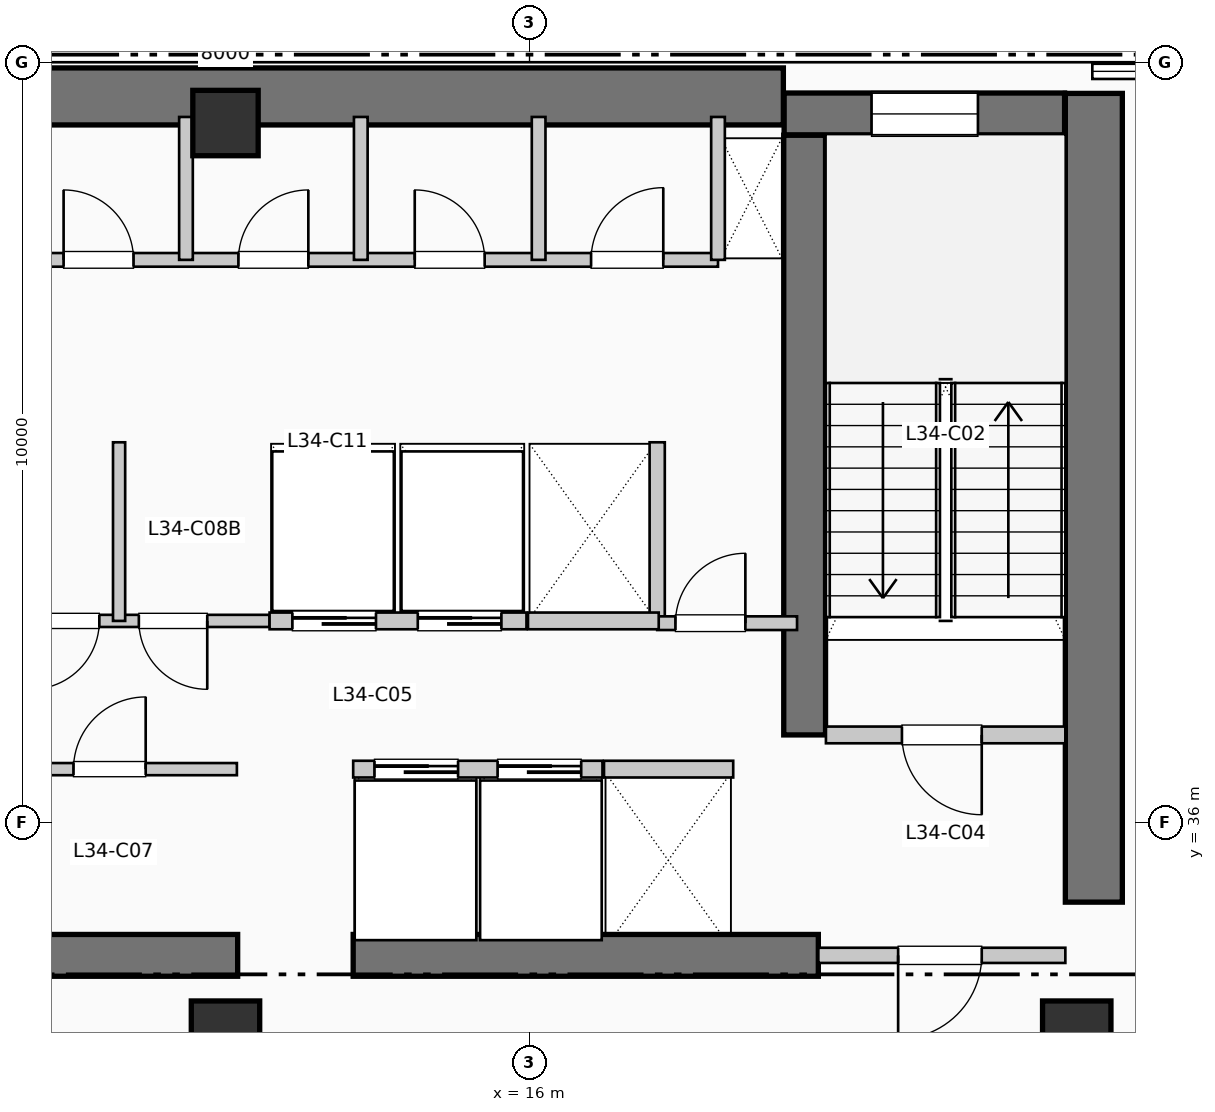
"""IFC4 building model, lengths in metres.
Left out: names, types, materials, properties, quantities, classifications, styles, units other than length and angle.
Written with IfcOpenShell. Run it as: python <this file> out.ifc"""

import sys

from ifc_helpers import new_model, si_unit, direction, frame, frame_2d, origin, origin_2d, place, context, subcontext, project, spatial, rectangle, extrude, element, fill, save


model = new_model("IFC4")
c1 = context("Model", 3, precision=1e-05, world=origin(), true_north=direction((0.0, 1.0)))
c2 = subcontext(c1, "Body", "Model", "MODEL_VIEW")
j1 = project(units=[si_unit("LENGTHUNIT", "METRE"), si_unit("PLANEANGLEUNIT", "RADIAN")], contexts=[c1])
p1 = place(None, origin())
s1 = spatial("IfcSite", under=j1, at=p1, CompositionType="ELEMENT")
p2 = place(p1, origin())
s2 = spatial("IfcBuilding", under=s1, at=p2, CompositionType="ELEMENT")
p3 = place(p2, frame((0.0, 0.0, 142.89)))
s3 = spatial("IfcBuildingStorey", under=s2, at=p3, CompositionType="ELEMENT", Elevation=142.89)
p4 = place(p3, frame((5.36, 45.55, 0.0), z_axis=(0.0, 0.0, 1.0), x_axis=(1.0, 0.0, 0.0)))
e1 = element("IfcWall", 1, at=p4, inside=s3, PredefinedType="SHEAR", context=c2, shape_type="SweptSolid", body=[
    extrude(rectangle(XDim=13.98, YDim=0.75, at=frame_2d((6.99, 0.0))), origin(), (0.0, 0.0, 1.0), 3.96),
])
p5 = place(p3, frame((23.425, 34.95, 0.0), z_axis=(0.0, 0.0, 1.0), x_axis=(0.0, 1.0, 0.0)))
e2 = element("IfcWall", 2, at=p5, inside=s3, PredefinedType="SHEAR", context=c2, shape_type="SweptSolid", body=[
    extrude(rectangle(XDim=10.64, YDim=0.75, at=frame_2d((5.32, 0.0))), origin(), (0.0, 0.0, 1.0), 3.96),
])
p6 = place(p3, frame((1.45, 34.25, 0.0), z_axis=(0.0, 0.0, 1.0), x_axis=(1.0, 0.0, 0.0)))
e3 = element("IfcWall", 3, at=p6, inside=s3, PredefinedType="SHEAR", context=c2, shape_type="SweptSolid", body=[
    extrude(rectangle(XDim=10.71, YDim=0.55, at=frame_2d((5.355, 0.0))), origin(), (0.0, 0.0, 1.0), 3.96),
])
p7 = place(p6, frame((7.25, 0.0, 0.0), z_axis=(0.0, 0.0, 1.0), x_axis=(-1.0, 0.0, 0.0)))
e4 = element("IfcOpeningElement", 4, at=p7, cuts=e3, PredefinedType="OPENING", context=c2, shape_type="SweptSolid", body=[
    extrude(rectangle(XDim=1.1, YDim=2.15, at=frame_2d((0.55, 1.075))), frame((0.0, 0.285, 0.0), z_axis=(0.0, -1.0, 0.0), x_axis=(1.0, 0.0, 0.0)), (0.0, 0.0, 1.0), 0.57),
])
p8 = place(p3, frame((13.68, 34.25, 0.0), z_axis=(0.0, 0.0, 1.0), x_axis=(1.0, 0.0, 0.0)))
e5 = element("IfcWall", 5, at=p8, inside=s3, PredefinedType="SHEAR", context=c2, shape_type="SweptSolid", body=[
    extrude(rectangle(XDim=6.12, YDim=0.55, at=frame_2d((3.06, 0.0))), origin(), (0.0, 0.0, 1.0), 3.96),
])
p9 = place(p3, frame((19.62, 37.15, 0.0), z_axis=(0.0, 0.0, 1.0), x_axis=(0.0, 1.0, 0.0)))
e6 = element("IfcWall", 6, at=p9, inside=s3, PredefinedType="SHEAR", context=c2, shape_type="SweptSolid", body=[
    extrude(rectangle(XDim=7.89, YDim=0.55, at=frame_2d((3.945, 0.0))), origin(), (0.0, 0.0, 1.0), 3.96),
])
p10 = place(p3, frame((19.35, 45.32, 0.0), z_axis=(0.0, 0.0, 1.0), x_axis=(1.0, 0.0, 0.0)))
e7 = element("IfcWall", 7, at=p10, inside=s3, PredefinedType="SHEAR", context=c2, shape_type="SweptSolid", body=[
    extrude(rectangle(XDim=3.69, YDim=0.55, at=frame_2d((1.845, 0.0))), origin(), (0.0, 0.0, 1.0), 3.96),
])
p11 = place(p10, frame((1.15, 0.0, 1.05)))
e8 = element("IfcOpeningElement", 8, at=p11, cuts=e7, PredefinedType="OPENING", context=c2, shape_type="SweptSolid", body=[
    extrude(rectangle(XDim=1.4, YDim=1.8, at=frame_2d((0.7, 0.9))), frame((0.0, 0.285, 0.0), z_axis=(0.0, -1.0, 0.0), x_axis=(1.0, 0.0, 0.0)), (0.0, 0.0, 1.0), 0.57),
])
p12 = place(p3, frame((12.0, 33.2, 0.0), z_axis=(0.0, 0.0, 1.0), x_axis=(1.0, 0.0, 0.0)))
e9 = element("IfcColumn", 9, at=p12, inside=s3, PredefinedType="COLUMN", context=c2, shape_type="SweptSolid", body=[
    extrude(rectangle(XDim=0.9, YDim=0.9, at=origin_2d()), origin(), (0.0, 0.0, 1.0), 3.96),
])
p13 = place(p3, frame((12.0, 45.2, 0.0), z_axis=(0.0, 0.0, 1.0), x_axis=(1.0, 0.0, 0.0)))
e10 = element("IfcColumn", 10, at=p13, inside=s3, PredefinedType="COLUMN", context=c2, shape_type="SweptSolid", body=[
    extrude(rectangle(XDim=0.86, YDim=0.86, at=origin_2d()), origin(), (0.0, 0.0, 1.0), 3.96),
])
p14 = place(p3, frame((23.2, 33.2, 0.0), z_axis=(0.0, 0.0, 1.0), x_axis=(1.0, 0.0, 0.0)))
e11 = element("IfcColumn", 11, at=p14, inside=s3, PredefinedType="COLUMN", context=c2, shape_type="SweptSolid", body=[
    extrude(rectangle(XDim=0.9, YDim=0.9, at=origin_2d()), origin(), (0.0, 0.0, 1.0), 3.96),
])
p15 = place(p3, frame((19.9, 37.15, 0.0), z_axis=(0.0, 0.0, 1.0), x_axis=(1.0, 0.0, 0.0)))
e12 = element("IfcWall", 12, at=p15, inside=s3, PredefinedType="PARTITIONING", context=c2, shape_type="SweptSolid", body=[
    extrude(rectangle(XDim=3.15, YDim=0.22, at=frame_2d((1.575, 0.0))), origin(), (0.0, 0.0, 1.0), 3.71),
])
p16 = place(p15, frame((2.05, 0.0, 0.0), z_axis=(0.0, 0.0, 1.0), x_axis=(-1.0, 0.0, 0.0)))
e13 = element("IfcOpeningElement", 13, at=p16, cuts=e12, PredefinedType="OPENING", context=c2, shape_type="SweptSolid", body=[
    extrude(rectangle(XDim=1.05, YDim=2.15, at=frame_2d((0.525, 1.075))), frame((0.0, 0.12, 0.0), z_axis=(0.0, -1.0, 0.0), x_axis=(1.0, 0.0, 0.0)), (0.0, 0.0, 1.0), 0.24),
])
p17 = place(p3, frame((19.8, 34.25, 0.0), z_axis=(0.0, 0.0, 1.0), x_axis=(1.0, 0.0, 0.0)))
e14 = element("IfcWall", 14, at=p17, inside=s3, PredefinedType="PARTITIONING", context=c2, shape_type="SweptSolid", body=[
    extrude(rectangle(XDim=3.25, YDim=0.2, at=frame_2d((1.625, 0.0))), origin(), (0.0, 0.0, 1.0), 3.71),
])
p18 = place(p17, frame((2.15, 0.0, 0.0), z_axis=(0.0, 0.0, 1.0), x_axis=(-1.0, 0.0, 0.0)))
e15 = element("IfcOpeningElement", 15, at=p18, cuts=e14, PredefinedType="OPENING", context=c2, shape_type="SweptSolid", body=[
    extrude(rectangle(XDim=1.1, YDim=2.15, at=frame_2d((0.55, 1.075))), frame((0.0, 0.11, 0.0), z_axis=(0.0, -1.0, 0.0), x_axis=(1.0, 0.0, 0.0)), (0.0, 0.0, 1.0), 0.22),
])
p19 = place(p3, frame((17.68, 38.65, 0.0), z_axis=(0.0, 0.0, 1.0), x_axis=(0.0, 1.0, 0.0)))
e16 = element("IfcWall", 16, at=p19, inside=s3, PredefinedType="PARTITIONING", context=c2, shape_type="SweptSolid", body=[
    extrude(rectangle(XDim=2.35, YDim=0.2, at=frame_2d((1.175, 0.0))), origin(), (0.0, 0.0, 1.0), 3.71),
])
p20 = place(p3, frame((17.68, 38.62, 0.0), z_axis=(0.0, 0.0, 1.0), x_axis=(1.0, 0.0, 0.0)))
e17 = element("IfcWall", 17, at=p20, inside=s3, PredefinedType="PARTITIONING", context=c2, shape_type="SweptSolid", body=[
    extrude(rectangle(XDim=1.84, YDim=0.18, at=frame_2d((0.92, 0.0))), origin(), (0.0, 0.0, 1.0), 3.71),
])
p21 = place(p20, frame((0.24, 0.0, 0.0)))
e18 = element("IfcOpeningElement", 18, at=p21, cuts=e17, PredefinedType="OPENING", context=c2, shape_type="SweptSolid", body=[
    extrude(rectangle(XDim=0.92, YDim=2.1, at=frame_2d((0.46, 1.05))), frame((0.0, 0.1, 0.0), z_axis=(0.0, -1.0, 0.0), x_axis=(1.0, 0.0, 0.0)), (0.0, 0.0, 1.0), 0.2),
])
p22 = place(p3, frame((8.9, 36.7, 0.0), z_axis=(0.0, 0.0, 1.0), x_axis=(1.0, 0.0, 0.0)))
e19 = element("IfcWall", 19, at=p22, inside=s3, PredefinedType="PARTITIONING", context=c2, shape_type="SweptSolid", body=[
    extrude(rectangle(XDim=3.25, YDim=0.16, at=frame_2d((1.625, 0.0))), origin(), (0.0, 0.0, 1.0), 3.71),
])
p23 = place(p22, frame((1.1, 0.0, 0.0)))
e20 = element("IfcOpeningElement", 20, at=p23, cuts=e19, PredefinedType="OPENING", context=c2, shape_type="SweptSolid", body=[
    extrude(rectangle(XDim=0.95, YDim=2.15, at=frame_2d((0.475, 1.075))), frame((0.0, 0.09, 0.0), z_axis=(0.0, -1.0, 0.0), x_axis=(1.0, 0.0, 0.0)), (0.0, 0.0, 1.0), 0.18),
])
p24 = place(p3, frame((9.16, 38.65, 0.0), z_axis=(0.0, 0.0, 1.0), x_axis=(1.0, 0.0, 0.0)))
e21 = element("IfcWall", 21, at=p24, inside=s3, PredefinedType="PARTITIONING", context=c2, shape_type="SweptSolid", body=[
    extrude(rectangle(XDim=3.42, YDim=0.16, at=frame_2d((1.71, 0.0))), origin(), (0.0, 0.0, 1.0), 3.71),
])
p25 = place(p24, frame((1.18, 0.0, 0.0), z_axis=(0.0, 0.0, 1.0), x_axis=(-1.0, 0.0, 0.0)))
e22 = element("IfcOpeningElement", 22, at=p25, cuts=e21, PredefinedType="OPENING", context=c2, shape_type="SweptSolid", body=[
    extrude(rectangle(XDim=0.9, YDim=2.15, at=frame_2d((0.45, 1.075))), frame((0.0, 0.09, 0.0), z_axis=(0.0, -1.0, 0.0), x_axis=(1.0, 0.0, 0.0)), (0.0, 0.0, 1.0), 0.18),
])
p26 = place(p24, frame((2.6, 0.0, 0.0), z_axis=(0.0, 0.0, 1.0), x_axis=(-1.0, 0.0, 0.0)))
e23 = element("IfcOpeningElement", 23, at=p26, cuts=e21, PredefinedType="OPENING", context=c2, shape_type="SweptSolid", body=[
    extrude(rectangle(XDim=0.9, YDim=2.15, at=frame_2d((0.45, 1.075))), frame((0.0, 0.09, 0.0), z_axis=(0.0, -1.0, 0.0), x_axis=(1.0, 0.0, 0.0)), (0.0, 0.0, 1.0), 0.18),
])
p27 = place(p3, frame((10.6, 38.65, 0.0), z_axis=(0.0, 0.0, 1.0), x_axis=(0.0, 1.0, 0.0)))
e24 = element("IfcWall", 24, at=p27, inside=s3, PredefinedType="PARTITIONING", context=c2, shape_type="SweptSolid", body=[
    extrude(rectangle(XDim=2.35, YDim=0.16, at=frame_2d((1.175, 0.0))), origin(), (0.0, 0.0, 1.0), 3.71),
])
p28 = place(p3, frame((13.68, 36.7, 0.0), z_axis=(0.0, 0.0, 1.0), x_axis=(1.0, 0.0, 0.0)))
e25 = element("IfcWall", 25, at=p28, inside=s3, PredefinedType="PARTITIONING", context=c2, shape_type="SweptSolid", body=[
    extrude(rectangle(XDim=3.28, YDim=0.22, at=frame_2d((1.64, 0.0))), origin(), (0.0, 0.0, 1.0), 3.71),
])
p29 = place(p28, frame((0.28, 0.0, 0.0)))
e26 = element("IfcOpeningElement", 26, at=p29, cuts=e25, PredefinedType="OPENING", context=c2, shape_type="SweptSolid", body=[
    extrude(rectangle(XDim=1.1, YDim=2.2, at=frame_2d((0.55, 1.1))), frame((0.0, 0.12, 0.0), z_axis=(0.0, -1.0, 0.0), x_axis=(1.0, 0.0, 0.0)), (0.0, 0.0, 1.0), 0.24),
])
p30 = place(p28, frame((1.9, 0.0, 0.0)))
e27 = element("IfcOpeningElement", 27, at=p30, cuts=e25, PredefinedType="OPENING", context=c2, shape_type="SweptSolid", body=[
    extrude(rectangle(XDim=1.1, YDim=2.2, at=frame_2d((0.55, 1.1))), frame((0.0, 0.12, 0.0), z_axis=(0.0, -1.0, 0.0), x_axis=(1.0, 0.0, 0.0)), (0.0, 0.0, 1.0), 0.24),
])
p31 = place(p3, frame((12.58, 38.65, 0.0), z_axis=(0.0, 0.0, 1.0), x_axis=(1.0, 0.0, 0.0)))
e28 = element("IfcWall", 28, at=p31, inside=s3, PredefinedType="PARTITIONING", context=c2, shape_type="SweptSolid", body=[
    extrude(rectangle(XDim=3.38, YDim=0.22, at=frame_2d((1.69, 0.0))), origin(), (0.0, 0.0, 1.0), 3.71),
])
p32 = place(p31, frame((0.3, 0.0, 0.0)))
e29 = element("IfcOpeningElement", 29, at=p32, cuts=e28, PredefinedType="OPENING", context=c2, shape_type="SweptSolid", body=[
    extrude(rectangle(XDim=1.1, YDim=2.2, at=frame_2d((0.55, 1.1))), frame((0.0, 0.12, 0.0), z_axis=(0.0, -1.0, 0.0), x_axis=(1.0, 0.0, 0.0)), (0.0, 0.0, 1.0), 0.24),
])
p33 = place(p31, frame((1.95, 0.0, 0.0)))
e30 = element("IfcOpeningElement", 30, at=p33, cuts=e28, PredefinedType="OPENING", context=c2, shape_type="SweptSolid", body=[
    extrude(rectangle(XDim=1.1, YDim=2.2, at=frame_2d((0.55, 1.1))), frame((0.0, 0.12, 0.0), z_axis=(0.0, -1.0, 0.0), x_axis=(1.0, 0.0, 0.0)), (0.0, 0.0, 1.0), 0.24),
])
p34 = place(p3, frame((16.98, 36.7, 0.0), z_axis=(0.0, 0.0, 1.0), x_axis=(1.0, 0.0, 0.0)))
e31 = element("IfcWall", 31, at=p34, inside=s3, PredefinedType="PARTITIONING", context=c2, shape_type="SweptSolid", body=[
    extrude(rectangle(XDim=1.7, YDim=0.22, at=frame_2d((0.85, 0.0))), origin(), (0.0, 0.0, 1.0), 3.71),
])
p35 = place(p3, frame((15.98, 38.65, 0.0), z_axis=(0.0, 0.0, 1.0), x_axis=(1.0, 0.0, 0.0)))
e32 = element("IfcWall", 32, at=p35, inside=s3, PredefinedType="PARTITIONING", context=c2, shape_type="SweptSolid", body=[
    extrude(rectangle(XDim=1.72, YDim=0.22, at=frame_2d((0.86, 0.0))), origin(), (0.0, 0.0, 1.0), 3.71),
])
p36 = place(p3, frame((9.15, 43.4, 0.0), z_axis=(0.0, 0.0, 1.0), x_axis=(1.0, 0.0, 0.0)))
e33 = element("IfcWall", 33, at=p36, inside=s3, PredefinedType="PLUMBINGWALL", context=c2, shape_type="SweptSolid", body=[
    extrude(rectangle(XDim=9.33, YDim=0.18, at=frame_2d((4.665, 0.0))), origin(), (0.0, 0.0, 1.0), 3.71),
])
p37 = place(p36, frame((0.72, 0.0, 0.0)))
e34 = element("IfcOpeningElement", 34, at=p37, cuts=e33, PredefinedType="OPENING", context=c2, shape_type="SweptSolid", body=[
    extrude(rectangle(XDim=0.92, YDim=2.1, at=frame_2d((0.46, 1.05))), frame((0.0, 0.1, 0.0), z_axis=(0.0, -1.0, 0.0), x_axis=(1.0, 0.0, 0.0)), (0.0, 0.0, 1.0), 0.2),
])
p38 = place(p36, frame((3.02, 0.0, 0.0)))
e35 = element("IfcOpeningElement", 35, at=p38, cuts=e33, PredefinedType="OPENING", context=c2, shape_type="SweptSolid", body=[
    extrude(rectangle(XDim=0.92, YDim=2.1, at=frame_2d((0.46, 1.05))), frame((0.0, 0.1, 0.0), z_axis=(0.0, -1.0, 0.0), x_axis=(1.0, 0.0, 0.0)), (0.0, 0.0, 1.0), 0.2),
])
p39 = place(p36, frame((5.34, 0.0, 0.0)))
e36 = element("IfcOpeningElement", 36, at=p39, cuts=e33, PredefinedType="OPENING", context=c2, shape_type="SweptSolid", body=[
    extrude(rectangle(XDim=0.92, YDim=2.1, at=frame_2d((0.46, 1.05))), frame((0.0, 0.1, 0.0), z_axis=(0.0, -1.0, 0.0), x_axis=(1.0, 0.0, 0.0)), (0.0, 0.0, 1.0), 0.2),
])
p40 = place(p36, frame((7.66, 0.0, 0.0)))
e37 = element("IfcOpeningElement", 37, at=p40, cuts=e33, PredefinedType="OPENING", context=c2, shape_type="SweptSolid", body=[
    extrude(rectangle(XDim=0.95, YDim=2.1, at=frame_2d((0.475, 1.05))), frame((0.0, 0.1, 0.0), z_axis=(0.0, -1.0, 0.0), x_axis=(1.0, 0.0, 0.0)), (0.0, 0.0, 1.0), 0.2),
])
for number, where, z_axis, x_axis in (
    (38, (18.48, 43.4, 0.0), (0.0, 0.0, 1.0), (0.0, 1.0, 0.0)),
    (39, (11.48, 43.4, 0.0), (0.0, 0.0, 1.0), (0.0, 1.0, 0.0)),
    (40, (13.78, 43.4, 0.0), (0.0, 0.0, 1.0), (0.0, 1.0, 0.0)),
    (41, (16.12, 43.4, 0.0), (0.0, 0.0, 1.0), (0.0, 1.0, 0.0)),
):
    element("IfcWall", number, at=place(p3, frame(where, z_axis=z_axis, x_axis=x_axis)), inside=s3, PredefinedType="PLUMBINGWALL", context=c2, shape_type="SweptSolid", body=[
        extrude(rectangle(XDim=1.88, YDim=0.18, at=frame_2d((0.94, 0.0))), origin(), (0.0, 0.0, 1.0), 3.71),
    ])
p41 = place(p11, origin())
e42 = element("IfcWindow", 42, at=p41, inside=s3, PartitioningType="SINGLE_PANEL", PredefinedType="WINDOW", context=c2, shape_type="SweptSolid", body=[
    extrude(rectangle(XDim=1.4, YDim=1.8, at=frame_2d((0.7, 0.9))), frame((0.0, 0.03, 0.0), z_axis=(0.0, -1.0, 0.0), x_axis=(1.0, 0.0, 0.0)), (0.0, 0.0, 1.0), 0.06),
])
fill(e8, e42)
p42 = place(p16, origin())
e43 = element("IfcDoor", 43, at=p42, inside=s3, OperationType="SINGLE_SWING_RIGHT", PredefinedType="DOOR", context=c2, shape_type="SweptSolid", body=[
    extrude(rectangle(XDim=1.05, YDim=2.15, at=frame_2d((0.525, 1.075))), frame((0.0, 0.025, 0.0), z_axis=(0.0, -1.0, 0.0), x_axis=(1.0, 0.0, 0.0)), (0.0, 0.0, 1.0), 0.05),
])
fill(e13, e43)
p43 = place(p18, origin())
e44 = element("IfcDoor", 44, at=p43, inside=s3, OperationType="SINGLE_SWING_LEFT", PredefinedType="DOOR", context=c2, shape_type="SweptSolid", body=[
    extrude(rectangle(XDim=1.1, YDim=2.15, at=frame_2d((0.55, 1.075))), frame((0.0, 0.025, 0.0), z_axis=(0.0, -1.0, 0.0), x_axis=(1.0, 0.0, 0.0)), (0.0, 0.0, 1.0), 0.05),
])
fill(e15, e44)
p44 = place(p21, origin())
e45 = element("IfcDoor", 45, at=p44, inside=s3, OperationType="SINGLE_SWING_RIGHT", PredefinedType="DOOR", context=c2, shape_type="SweptSolid", body=[
    extrude(rectangle(XDim=0.92, YDim=2.1, at=frame_2d((0.46, 1.05))), frame((0.0, 0.025, 0.0), z_axis=(0.0, -1.0, 0.0), x_axis=(1.0, 0.0, 0.0)), (0.0, 0.0, 1.0), 0.05),
])
fill(e18, e45)
p45 = place(p23, origin())
e46 = element("IfcDoor", 46, at=p45, inside=s3, OperationType="SINGLE_SWING_RIGHT", PredefinedType="DOOR", context=c2, shape_type="SweptSolid", body=[
    extrude(rectangle(XDim=0.95, YDim=2.15, at=frame_2d((0.475, 1.075))), frame((0.0, 0.025, 0.0), z_axis=(0.0, -1.0, 0.0), x_axis=(1.0, 0.0, 0.0)), (0.0, 0.0, 1.0), 0.05),
])
fill(e20, e46)
p46 = place(p25, origin())
e47 = element("IfcDoor", 47, at=p46, inside=s3, OperationType="SINGLE_SWING_LEFT", PredefinedType="DOOR", context=c2, shape_type="SweptSolid", body=[
    extrude(rectangle(XDim=0.9, YDim=2.15, at=frame_2d((0.45, 1.075))), frame((0.0, 0.025, 0.0), z_axis=(0.0, -1.0, 0.0), x_axis=(1.0, 0.0, 0.0)), (0.0, 0.0, 1.0), 0.05),
])
fill(e22, e47)
p47 = place(p26, origin())
e48 = element("IfcDoor", 48, at=p47, inside=s3, OperationType="SINGLE_SWING_RIGHT", PredefinedType="DOOR", context=c2, shape_type="SweptSolid", body=[
    extrude(rectangle(XDim=0.9, YDim=2.15, at=frame_2d((0.45, 1.075))), frame((0.0, 0.025, 0.0), z_axis=(0.0, -1.0, 0.0), x_axis=(1.0, 0.0, 0.0)), (0.0, 0.0, 1.0), 0.05),
])
fill(e23, e48)
p48 = place(p29, origin())
e49 = element("IfcDoor", 49, at=p48, inside=s3, OperationType="SLIDING_TO_RIGHT", PredefinedType="DOOR", context=c2, shape_type="SweptSolid", body=[
    extrude(rectangle(XDim=1.1, YDim=2.2, at=frame_2d((0.55, 1.1))), frame((0.0, 0.025, 0.0), z_axis=(0.0, -1.0, 0.0), x_axis=(1.0, 0.0, 0.0)), (0.0, 0.0, 1.0), 0.05),
])
fill(e26, e49)
p49 = place(p30, origin())
e50 = element("IfcDoor", 50, at=p49, inside=s3, OperationType="SLIDING_TO_RIGHT", PredefinedType="DOOR", context=c2, shape_type="SweptSolid", body=[
    extrude(rectangle(XDim=1.1, YDim=2.2, at=frame_2d((0.55, 1.1))), frame((0.0, 0.025, 0.0), z_axis=(0.0, -1.0, 0.0), x_axis=(1.0, 0.0, 0.0)), (0.0, 0.0, 1.0), 0.05),
])
fill(e27, e50)
p50 = place(p32, origin())
e51 = element("IfcDoor", 51, at=p50, inside=s3, OperationType="SLIDING_TO_RIGHT", PredefinedType="DOOR", context=c2, shape_type="SweptSolid", body=[
    extrude(rectangle(XDim=1.1, YDim=2.2, at=frame_2d((0.55, 1.1))), frame((0.0, 0.025, 0.0), z_axis=(0.0, -1.0, 0.0), x_axis=(1.0, 0.0, 0.0)), (0.0, 0.0, 1.0), 0.05),
])
fill(e29, e51)
p51 = place(p33, origin())
e52 = element("IfcDoor", 52, at=p51, inside=s3, OperationType="SLIDING_TO_RIGHT", PredefinedType="DOOR", context=c2, shape_type="SweptSolid", body=[
    extrude(rectangle(XDim=1.1, YDim=2.2, at=frame_2d((0.55, 1.1))), frame((0.0, 0.025, 0.0), z_axis=(0.0, -1.0, 0.0), x_axis=(1.0, 0.0, 0.0)), (0.0, 0.0, 1.0), 0.05),
])
fill(e30, e52)
p52 = place(p37, origin())
e53 = element("IfcDoor", 53, at=p52, inside=s3, OperationType="SINGLE_SWING_LEFT", PredefinedType="DOOR", context=c2, shape_type="SweptSolid", body=[
    extrude(rectangle(XDim=0.92, YDim=2.1, at=frame_2d((0.46, 1.05))), frame((0.0, 0.025, 0.0), z_axis=(0.0, -1.0, 0.0), x_axis=(1.0, 0.0, 0.0)), (0.0, 0.0, 1.0), 0.05),
])
fill(e34, e53)
p53 = place(p38, origin())
e54 = element("IfcDoor", 54, at=p53, inside=s3, OperationType="SINGLE_SWING_RIGHT", PredefinedType="DOOR", context=c2, shape_type="SweptSolid", body=[
    extrude(rectangle(XDim=0.92, YDim=2.1, at=frame_2d((0.46, 1.05))), frame((0.0, 0.025, 0.0), z_axis=(0.0, -1.0, 0.0), x_axis=(1.0, 0.0, 0.0)), (0.0, 0.0, 1.0), 0.05),
])
fill(e35, e54)
p54 = place(p39, origin())
e55 = element("IfcDoor", 55, at=p54, inside=s3, OperationType="SINGLE_SWING_LEFT", PredefinedType="DOOR", context=c2, shape_type="SweptSolid", body=[
    extrude(rectangle(XDim=0.92, YDim=2.1, at=frame_2d((0.46, 1.05))), frame((0.0, 0.025, 0.0), z_axis=(0.0, -1.0, 0.0), x_axis=(1.0, 0.0, 0.0)), (0.0, 0.0, 1.0), 0.05),
])
fill(e36, e55)
p55 = place(p40, origin())
e56 = element("IfcDoor", 56, at=p55, inside=s3, OperationType="SINGLE_SWING_RIGHT", PredefinedType="DOOR", context=c2, shape_type="SweptSolid", body=[
    extrude(rectangle(XDim=0.95, YDim=2.1, at=frame_2d((0.475, 1.05))), frame((0.0, 0.025, 0.0), z_axis=(0.0, -1.0, 0.0), x_axis=(1.0, 0.0, 0.0)), (0.0, 0.0, 1.0), 0.05),
])
fill(e37, e56)
save(model, sys.argv[1])
